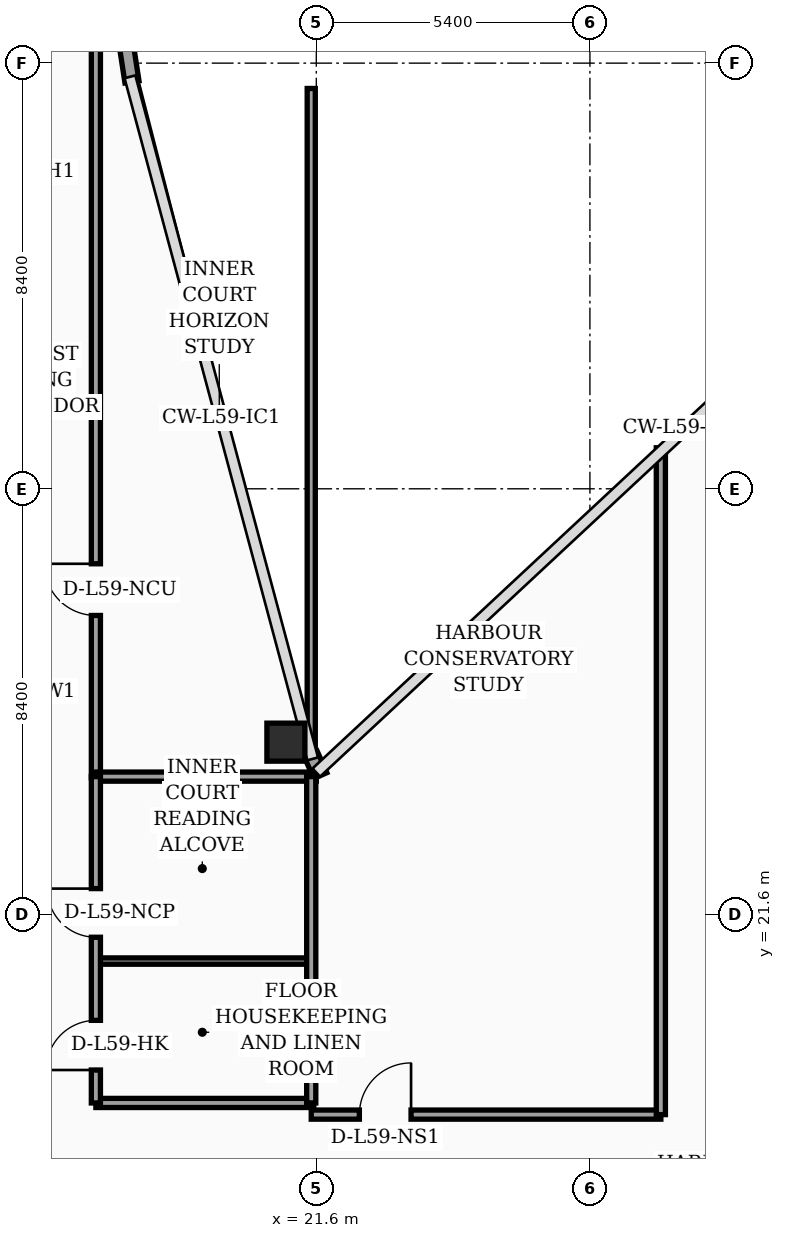
"""IFC4 building model, lengths in metres.
Left out: names, types, materials, properties, quantities, classifications, styles, units other than length and angle.
Written with IfcOpenShell. Run it as: python <this file> out.ifc"""

import sys

from ifc_helpers import new_model, si_unit, direction, frame, frame_2d, origin, origin_2d, place, context, subcontext, project, spatial, rectangle, hollow_rectangle, extrude, element, fill, save


model = new_model("IFC4")
c1 = context("Model", 3, precision=1e-05, world=origin(), true_north=direction((0.0, 1.0)))
c2 = subcontext(c1, "Body", "Model", "MODEL_VIEW")
j1 = project(units=[si_unit("LENGTHUNIT", "METRE"), si_unit("PLANEANGLEUNIT", "RADIAN")], contexts=[c1])
p1 = place(None, origin())
s1 = spatial("IfcSite", under=j1, at=p1, CompositionType="ELEMENT")
p2 = place(p1, origin())
s2 = spatial("IfcBuilding", under=s1, at=p2, CompositionType="ELEMENT")
p3 = place(p2, frame((0.0, 0.0, 239.3)))
s3 = spatial("IfcBuildingStorey", under=s2, at=p3, CompositionType="ELEMENT", Elevation=239.3)
p4 = place(p3, frame((21.0, 25.0, 0.0), z_axis=(0.0, 0.0, 1.0), x_axis=(1.0, 0.0, 0.0)))
e1 = element("IfcColumn", 1, at=p4, inside=s3, PredefinedType="COLUMN", context=c2, shape_type="SweptSolid", body=[
    extrude(hollow_rectangle(XDim=0.75, YDim=0.75, WallThickness=0.032, at=origin_2d()), origin(), (0.0, 0.0, 1.0), 4.05),
])
p5 = place(p3, frame((21.68, 24.34, 0.0), z_axis=(0.0, 0.0, 1.0), x_axis=(-0.40758134973, 0.913168901875, 0.0)))
e2 = element("IfcWall", 2, at=p5, inside=s3, PredefinedType="SOLIDWALL", context=c2, shape_type="SweptSolid", body=[
    extrude(rectangle(XDim=0.471, YDim=0.28, at=frame_2d((0.235, 0.0))), origin(), (0.0, 0.0, 1.0), 4.05),
])
p6 = place(p3, frame((17.962, 38.03, 0.0), z_axis=(0.0, 0.0, 1.0), x_axis=(-0.15141125477, 0.988470855377, 0.0)))
e3 = element("IfcWall", 3, at=p6, inside=s3, PredefinedType="SOLIDWALL", context=c2, shape_type="SweptSolid", body=[
    extrude(rectangle(XDim=0.739, YDim=0.28, at=frame_2d((0.369, 0.0))), origin(), (0.0, 0.0, 1.0), 4.05),
])
p7 = place(p3, frame((17.25, 24.3, 0.0), z_axis=(0.0, 0.0, 1.0), x_axis=(0.0, 1.0, 0.0)))
e4 = element("IfcWall", 4, at=p7, inside=s3, PredefinedType="PARTITIONING", context=c2, shape_type="SweptSolid", body=[
    extrude(rectangle(XDim=18.15, YDim=0.18, at=frame_2d((9.075, 0.0))), origin(), (0.0, 0.0, 1.0), 3.5),
])
p8 = place(p7, frame((3.2, 0.0, 0.0)))
e5 = element("IfcOpeningElement", 5, at=p8, cuts=e4, PredefinedType="OPENING", context=c2, shape_type="SweptSolid", body=[
    extrude(rectangle(XDim=1.02, YDim=2.2, at=frame_2d((0.51, 1.1))), frame((0.0, 0.1, 0.0), z_axis=(0.0, -1.0, 0.0), x_axis=(1.0, 0.0, 0.0)), (0.0, 0.0, 1.0), 0.2),
])
p9 = place(p3, frame((17.25, 17.88, 0.0), z_axis=(0.0, 0.0, 1.0), x_axis=(1.0, 0.0, 0.0)))
e6 = element("IfcWall", 6, at=p9, inside=s3, PredefinedType="PARTITIONING", context=c2, shape_type="SweptSolid", body=[
    extrude(rectangle(XDim=4.3, YDim=0.18, at=frame_2d((2.15, 0.0))), origin(), (0.0, 0.0, 1.0), 4.05),
])
p10 = place(p3, frame((17.25, 20.68, 0.0), z_axis=(0.0, 0.0, 1.0), x_axis=(1.0, 0.0, 0.0)))
e7 = element("IfcWall", 7, at=p10, inside=s3, PredefinedType="PARTITIONING", context=c2, shape_type="SweptSolid", body=[
    extrude(rectangle(XDim=4.3, YDim=0.125, at=frame_2d((2.15, 0.0))), origin(), (0.0, 0.0, 1.0), 4.05),
])
p11 = place(p3, frame((17.25, 24.32, 0.0), z_axis=(0.0, 0.0, 1.0), x_axis=(1.0, 0.0, 0.0)))
e8 = element("IfcWall", 8, at=p11, inside=s3, PredefinedType="PARTITIONING", context=c2, shape_type="SweptSolid", body=[
    extrude(rectangle(XDim=4.35, YDim=0.18, at=frame_2d((2.175, 0.0))), origin(), (0.0, 0.0, 1.0), 4.05),
])
p12 = place(p3, frame((21.5, 17.88, 0.0), z_axis=(0.0, 0.0, 1.0), x_axis=(0.0, 1.0, 0.0)))
e9 = element("IfcWall", 9, at=p12, inside=s3, PredefinedType="PARTITIONING", context=c2, shape_type="SweptSolid", body=[
    extrude(rectangle(XDim=6.44, YDim=0.18, at=frame_2d((3.22, 0.0))), origin(), (0.0, 0.0, 1.0), 4.05),
])
p13 = place(p3, frame((17.25, 17.88, 0.0), z_axis=(0.0, 0.0, 1.0), x_axis=(0.0, 1.0, 0.0)))
e10 = element("IfcWall", 10, at=p13, inside=s3, PredefinedType="PARTITIONING", context=c2, shape_type="SweptSolid", body=[
    extrude(rectangle(XDim=6.44, YDim=0.18, at=frame_2d((3.22, 0.0))), origin(), (0.0, 0.0, 1.0), 4.05),
])
p14 = place(p13, frame((0.65, 0.0, 0.0)))
e11 = element("IfcOpeningElement", 11, at=p14, cuts=e10, PredefinedType="OPENING", context=c2, shape_type="SweptSolid", body=[
    extrude(rectangle(XDim=0.98, YDim=2.15, at=frame_2d((0.49, 1.075))), frame((0.0, 0.1, 0.0), z_axis=(0.0, -1.0, 0.0), x_axis=(1.0, 0.0, 0.0)), (0.0, 0.0, 1.0), 0.2),
])
p15 = place(p13, frame((3.27, 0.0, 0.0)))
e12 = element("IfcOpeningElement", 12, at=p15, cuts=e10, PredefinedType="OPENING", context=c2, shape_type="SweptSolid", body=[
    extrude(rectangle(XDim=0.96, YDim=2.2, at=frame_2d((0.48, 1.1))), frame((0.0, 0.1, 0.0), z_axis=(0.0, -1.0, 0.0), x_axis=(1.0, 0.0, 0.0)), (0.0, 0.0, 1.0), 0.2),
])
p16 = place(p3, frame((21.5, 24.85, 0.0), z_axis=(0.0, 0.0, 1.0), x_axis=(0.0, 1.0, 0.0)))
e13 = element("IfcWall", 13, at=p16, inside=s3, PredefinedType="PARTITIONING", context=c2, shape_type="SweptSolid", body=[
    extrude(rectangle(XDim=13.05, YDim=0.16, at=frame_2d((6.525, 0.0))), origin(), (0.0, 0.0, 1.0), 2.35),
])
p17 = place(p3, frame((21.5, 17.65, 0.0), z_axis=(0.0, 0.0, 1.0), x_axis=(1.0, 0.0, 0.0)))
e14 = element("IfcWall", 14, at=p17, inside=s3, PredefinedType="PARTITIONING", context=c2, shape_type="SweptSolid", body=[
    extrude(rectangle(XDim=6.9, YDim=0.18, at=frame_2d((3.45, 0.0))), origin(), (0.0, 0.0, 1.0), 2.35),
])
p18 = place(p17, frame((0.95, 0.0, 0.0)))
e15 = element("IfcOpeningElement", 15, at=p18, cuts=e14, PredefinedType="OPENING", context=c2, shape_type="SweptSolid", body=[
    extrude(rectangle(XDim=1.02, YDim=2.2, at=frame_2d((0.51, 1.1))), frame((0.0, 0.1, 0.0), z_axis=(0.0, -1.0, 0.0), x_axis=(1.0, 0.0, 0.0)), (0.0, 0.0, 1.0), 0.2),
])
p19 = place(p3, frame((28.4, 17.65, 0.0), z_axis=(0.0, 0.0, 1.0), x_axis=(0.0, 1.0, 0.0)))
e16 = element("IfcWall", 16, at=p19, inside=s3, PredefinedType="PARTITIONING", context=c2, shape_type="SweptSolid", body=[
    extrude(rectangle(XDim=13.16, YDim=0.18, at=frame_2d((6.58, 0.0))), origin(), (0.0, 0.0, 1.0), 2.35),
])
p20 = place(p8, origin())
e17 = element("IfcDoor", 17, at=p20, inside=s3, OperationType="SINGLE_SWING_RIGHT", PredefinedType="DOOR", context=c2, shape_type="SweptSolid", body=[
    extrude(rectangle(XDim=1.02, YDim=2.2, at=frame_2d((0.51, 1.1))), frame((0.0, 0.025, 0.0), z_axis=(0.0, -1.0, 0.0), x_axis=(1.0, 0.0, 0.0)), (0.0, 0.0, 1.0), 0.05),
])
fill(e5, e17)
p21 = place(p14, origin())
e18 = element("IfcDoor", 18, at=p21, inside=s3, OperationType="SINGLE_SWING_LEFT", PredefinedType="DOOR", context=c2, shape_type="SweptSolid", body=[
    extrude(rectangle(XDim=0.98, YDim=2.15, at=frame_2d((0.49, 1.075))), frame((0.0, 0.025, 0.0), z_axis=(0.0, -1.0, 0.0), x_axis=(1.0, 0.0, 0.0)), (0.0, 0.0, 1.0), 0.05),
])
fill(e11, e18)
p22 = place(p15, origin())
e19 = element("IfcDoor", 19, at=p22, inside=s3, OperationType="SINGLE_SWING_RIGHT", PredefinedType="DOOR", context=c2, shape_type="SweptSolid", body=[
    extrude(rectangle(XDim=0.96, YDim=2.2, at=frame_2d((0.48, 1.1))), frame((0.0, 0.025, 0.0), z_axis=(0.0, -1.0, 0.0), x_axis=(1.0, 0.0, 0.0)), (0.0, 0.0, 1.0), 0.05),
])
fill(e12, e19)
p23 = place(p18, origin())
e20 = element("IfcDoor", 20, at=p23, inside=s3, OperationType="SINGLE_SWING_RIGHT", PredefinedType="DOOR", context=c2, shape_type="SweptSolid", body=[
    extrude(rectangle(XDim=1.02, YDim=2.2, at=frame_2d((0.51, 1.1))), frame((0.0, 0.025, 0.0), z_axis=(0.0, -1.0, 0.0), x_axis=(1.0, 0.0, 0.0)), (0.0, 0.0, 1.0), 0.05),
])
fill(e15, e20)
save(model, sys.argv[1])
